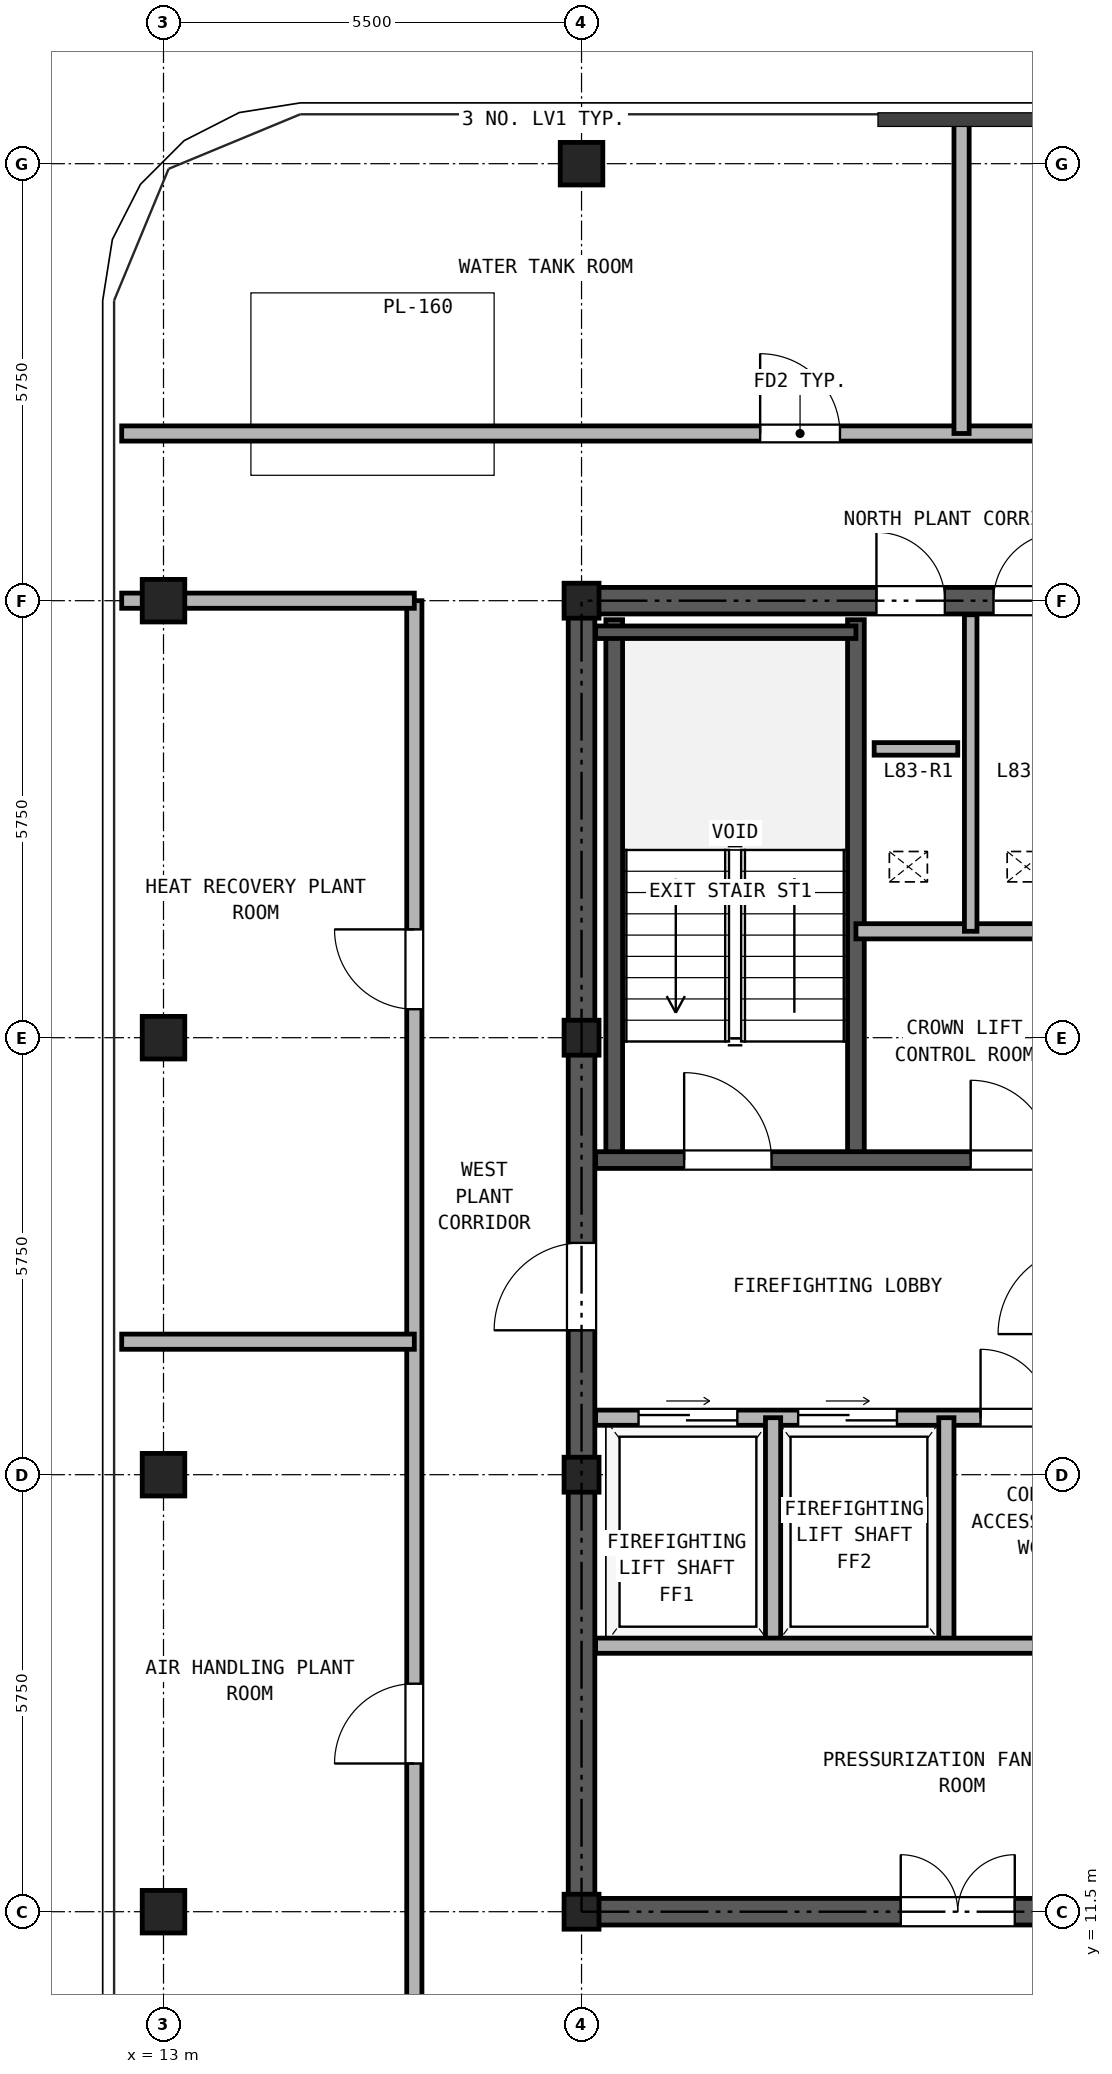
"""IFC4 building model, lengths in metres.
Left out: names, types, materials, properties, quantities, classifications, styles, units other than length and angle.
Written with IfcOpenShell. Run it as: python <this file> out.ifc"""

import sys

from ifc_helpers import new_model, si_unit, direction, frame, frame_2d, origin, origin_2d, place, context, subcontext, project, spatial, rectangle, hollow_rectangle, extrude, source, transform, mapped, element, fill, save


model = new_model("IFC4")
c1 = context("Model", 3, precision=1e-05, world=origin(), true_north=direction((0.0, 1.0)))
c2 = subcontext(c1, "Body", "Model", "MODEL_VIEW")
j1 = project(units=[si_unit("LENGTHUNIT", "METRE"), si_unit("PLANEANGLEUNIT", "RADIAN")], contexts=[c1])
p1 = place(None, origin())
s1 = spatial("IfcSite", under=j1, at=p1, CompositionType="ELEMENT")
p2 = place(p1, origin())
s2 = spatial("IfcBuilding", under=s1, at=p2, CompositionType="ELEMENT")
p3 = place(p2, frame((0.0, 0.0, 289.3)))
s3 = spatial("IfcBuildingStorey", under=s2, at=p3, CompositionType="ELEMENT", Elevation=289.3)
m1 = source(origin(), c2, "Body", "SweptSolid", [
    extrude(hollow_rectangle(XDim=0.56, YDim=0.56, WallThickness=0.03, at=origin_2d()), origin(), (0.0, 0.0, 1.0), 3.38),
])
for number, where, z_axis, x_axis in (
    (1, (18.5, 34.5, 0.0), (0.0, 0.0, 1.0), (1.0, 0.0, 0.0)),
    (2, (13.0, 11.5, 0.0), (0.0, 0.0, 1.0), (1.0, 0.0, 0.0)),
    (3, (13.0, 17.25, 0.0), (0.0, 0.0, 1.0), (1.0, 0.0, 0.0)),
    (4, (13.0, 23.0, 0.0), (0.0, 0.0, 1.0), (1.0, 0.0, 0.0)),
    (5, (13.0, 28.75, 0.0), (0.0, 0.0, 1.0), (1.0, 0.0, 0.0)),
):
    element("IfcColumn", number, at=place(p3, frame(where, z_axis=z_axis, x_axis=x_axis)), inside=s3, PredefinedType="COLUMN", context=c2, shape_type="MappedRepresentation", body=[
        mapped(m1, transform((0.0, 0.0, 0.0), x_axis=(1.0, 0.0, 0.0), y_axis=(0.0, 1.0, 0.0), z_axis=(0.0, 0.0, 1.0), scale=1.0)),
    ])
m2 = source(origin(), c2, "Body", "SweptSolid", [
    extrude(hollow_rectangle(XDim=0.46, YDim=0.46, WallThickness=0.025, at=origin_2d()), origin(), (0.0, 0.0, 1.0), 3.38),
])
for number, where, z_axis, x_axis in (
    (6, (18.5, 11.5, 0.0), (0.0, 0.0, 1.0), (1.0, 0.0, 0.0)),
    (7, (18.5, 17.25, 0.0), (0.0, 0.0, 1.0), (1.0, 0.0, 0.0)),
    (8, (18.5, 23.0, 0.0), (0.0, 0.0, 1.0), (1.0, 0.0, 0.0)),
    (9, (18.5, 28.75, 0.0), (0.0, 0.0, 1.0), (1.0, 0.0, 0.0)),
):
    element("IfcColumn", number, at=place(p3, frame(where, z_axis=z_axis, x_axis=x_axis)), inside=s3, PredefinedType="COLUMN", context=c2, shape_type="MappedRepresentation", body=[
        mapped(m2, transform((0.0, 0.0, 0.0), x_axis=(1.0, 0.0, 0.0), y_axis=(0.0, 1.0, 0.0), z_axis=(0.0, 0.0, 1.0), scale=1.0)),
    ])
p4 = place(p3, frame((18.325, 11.5, 0.0), z_axis=(0.0, 0.0, 1.0), x_axis=(1.0, 0.0, 0.0)))
e10 = element("IfcWall", 10, at=p4, inside=s3, PredefinedType="SHEAR", context=c2, shape_type="SweptSolid", body=[
    extrude(rectangle(XDim=10.35, YDim=0.35, at=frame_2d((5.175, 0.0))), origin(), (0.0, 0.0, 1.0), 3.38),
])
p5 = place(p4, frame((4.375, 0.0, 0.0)))
e11 = element("IfcOpeningElement", 11, at=p5, cuts=e10, PredefinedType="OPENING", context=c2, shape_type="SweptSolid", body=[
    extrude(rectangle(XDim=1.5, YDim=2.25, at=frame_2d((0.75, 1.125))), frame((0.0, 0.185, 0.0), z_axis=(0.0, -1.0, 0.0), x_axis=(1.0, 0.0, 0.0)), (0.0, 0.0, 1.0), 0.37),
])
p6 = place(p3, frame((18.325, 28.75, 0.0), z_axis=(0.0, 0.0, 1.0), x_axis=(1.0, 0.0, 0.0)))
e12 = element("IfcWall", 12, at=p6, inside=s3, PredefinedType="SHEAR", context=c2, shape_type="SweptSolid", body=[
    extrude(rectangle(XDim=10.35, YDim=0.35, at=frame_2d((5.175, 0.0))), origin(), (0.0, 0.0, 1.0), 3.38),
])
p7 = place(p6, frame((4.055, 0.0, 0.0)))
e13 = element("IfcOpeningElement", 13, at=p7, cuts=e12, PredefinedType="OPENING", context=c2, shape_type="SweptSolid", body=[
    extrude(rectangle(XDim=0.9, YDim=2.05, at=frame_2d((0.45, 1.025))), frame((0.0, 0.185, 0.0), z_axis=(0.0, -1.0, 0.0), x_axis=(1.0, 0.0, 0.0)), (0.0, 0.0, 1.0), 0.37),
])
p8 = place(p6, frame((5.595, 0.0, 0.0)))
e14 = element("IfcOpeningElement", 14, at=p8, cuts=e12, PredefinedType="OPENING", context=c2, shape_type="SweptSolid", body=[
    extrude(rectangle(XDim=0.9, YDim=2.05, at=frame_2d((0.45, 1.025))), frame((0.0, 0.185, 0.0), z_axis=(0.0, -1.0, 0.0), x_axis=(1.0, 0.0, 0.0)), (0.0, 0.0, 1.0), 0.37),
])
p9 = place(p3, frame((18.5, 11.675, 0.0), z_axis=(0.0, 0.0, 1.0), x_axis=(0.0, 1.0, 0.0)))
e15 = element("IfcWall", 15, at=p9, inside=s3, PredefinedType="SHEAR", context=c2, shape_type="SweptSolid", body=[
    extrude(rectangle(XDim=16.9, YDim=0.35, at=frame_2d((8.45, 0.0))), origin(), (0.0, 0.0, 1.0), 3.38),
])
p10 = place(p9, frame((7.475, 0.0, 0.0)))
e16 = element("IfcOpeningElement", 16, at=p10, cuts=e15, PredefinedType="OPENING", context=c2, shape_type="SweptSolid", body=[
    extrude(rectangle(XDim=1.15, YDim=2.2, at=frame_2d((0.575, 1.1))), frame((0.0, 0.185, 0.0), z_axis=(0.0, -1.0, 0.0), x_axis=(1.0, 0.0, 0.0)), (0.0, 0.0, 1.0), 0.37),
])
for number, where, z_axis, x_axis in (
    (17, (18.93, 21.39, 0.0), (0.0, 0.0, 1.0), (0.0, 1.0, 0.0)),
    (18, (22.11, 21.39, 0.0), (0.0, 0.0, 1.0), (0.0, 1.0, 0.0)),
):
    element("IfcWall", number, at=place(p3, frame(where, z_axis=z_axis, x_axis=x_axis)), inside=s3, PredefinedType="SOLIDWALL", context=c2, shape_type="SweptSolid", body=[
        extrude(rectangle(XDim=7.11, YDim=0.22, at=frame_2d((3.555, 0.0))), origin(), (0.0, 0.0, 1.0), 3.38),
    ])
p11 = place(p3, frame((18.685, 28.335, 0.0), z_axis=(0.0, 0.0, 1.0), x_axis=(1.0, 0.0, 0.0)))
e19 = element("IfcWall", 19, at=p11, inside=s3, PredefinedType="PARTITIONING", context=c2, shape_type="SweptSolid", body=[
    extrude(rectangle(XDim=3.425, YDim=0.165, at=frame_2d((1.712, 0.0))), origin(), (0.0, 0.0, 1.0), 3.38),
])
p12 = place(p3, frame((18.685, 21.39, 0.0), z_axis=(0.0, 0.0, 1.0), x_axis=(1.0, 0.0, 0.0)))
e20 = element("IfcWall", 20, at=p12, inside=s3, PredefinedType="SOLIDWALL", context=c2, shape_type="SweptSolid", body=[
    extrude(rectangle(XDim=6.445, YDim=0.22, at=frame_2d((3.222, 0.0))), origin(), (0.0, 0.0, 1.0), 3.38),
])
p13 = place(p12, frame((1.165, 0.0, 0.0)))
e21 = element("IfcOpeningElement", 21, at=p13, cuts=e20, PredefinedType="OPENING", context=c2, shape_type="SweptSolid", body=[
    extrude(rectangle(XDim=1.15, YDim=2.2, at=frame_2d((0.575, 1.1))), frame((0.0, 0.12, 0.0), z_axis=(0.0, -1.0, 0.0), x_axis=(1.0, 0.0, 0.0)), (0.0, 0.0, 1.0), 0.24),
])
p14 = place(p12, frame((4.935, 0.0, 0.0)))
e22 = element("IfcOpeningElement", 22, at=p14, cuts=e20, PredefinedType="OPENING", context=c2, shape_type="SweptSolid", body=[
    extrude(rectangle(XDim=1.05, YDim=2.15, at=frame_2d((0.525, 1.075))), frame((0.0, 0.12, 0.0), z_axis=(0.0, -1.0, 0.0), x_axis=(1.0, 0.0, 0.0)), (0.0, 0.0, 1.0), 0.24),
])
p15 = place(p3, frame((22.11, 24.4, 0.0), z_axis=(0.0, 0.0, 1.0), x_axis=(1.0, 0.0, 0.0)))
e23 = element("IfcWall", 23, at=p15, inside=s3, PredefinedType="PARTITIONING", context=c2, shape_type="SweptSolid", body=[
    extrude(rectangle(XDim=3.02, YDim=0.2, at=frame_2d((1.51, 0.0))), origin(), (0.0, 0.0, 1.0), 3.38),
])
p16 = place(p3, frame((23.62, 24.4, 0.0), z_axis=(0.0, 0.0, 1.0), x_axis=(0.0, 1.0, 0.0)))
e24 = element("IfcWall", 24, at=p16, inside=s3, PredefinedType="PARTITIONING", context=c2, shape_type="SweptSolid", body=[
    extrude(rectangle(XDim=4.165, YDim=0.165, at=frame_2d((2.083, 0.0))), origin(), (0.0, 0.0, 1.0), 3.38),
])
p17 = place(p3, frame((18.685, 18.0, 0.0), z_axis=(0.0, 0.0, 1.0), x_axis=(1.0, 0.0, 0.0)))
e25 = element("IfcWall", 25, at=p17, inside=s3, PredefinedType="PARTITIONING", context=c2, shape_type="SweptSolid", body=[
    extrude(rectangle(XDim=9.63, YDim=0.2, at=frame_2d((4.815, 0.0))), origin(), (0.0, 0.0, 1.0), 3.38),
])
p18 = place(p17, frame((0.565, 0.0, 0.0)))
e26 = element("IfcOpeningElement", 26, at=p18, cuts=e25, PredefinedType="OPENING", context=c2, shape_type="SweptSolid", body=[
    extrude(rectangle(XDim=1.3, YDim=2.3, at=frame_2d((0.65, 1.15))), frame((0.0, 0.11, 0.0), z_axis=(0.0, -1.0, 0.0), x_axis=(1.0, 0.0, 0.0)), (0.0, 0.0, 1.0), 0.22),
])
p19 = place(p17, frame((2.665, 0.0, 0.0)))
e27 = element("IfcOpeningElement", 27, at=p19, cuts=e25, PredefinedType="OPENING", context=c2, shape_type="SweptSolid", body=[
    extrude(rectangle(XDim=1.3, YDim=2.3, at=frame_2d((0.65, 1.15))), frame((0.0, 0.11, 0.0), z_axis=(0.0, -1.0, 0.0), x_axis=(1.0, 0.0, 0.0)), (0.0, 0.0, 1.0), 0.22),
])
p20 = place(p17, frame((5.065, 0.0, 0.0)))
e28 = element("IfcOpeningElement", 28, at=p20, cuts=e25, PredefinedType="OPENING", context=c2, shape_type="SweptSolid", body=[
    extrude(rectangle(XDim=0.9, YDim=2.05, at=frame_2d((0.45, 1.025))), frame((0.0, 0.11, 0.0), z_axis=(0.0, -1.0, 0.0), x_axis=(1.0, 0.0, 0.0)), (0.0, 0.0, 1.0), 0.22),
])
p21 = place(p17, frame((7.765, 0.0, 0.0)))
e29 = element("IfcOpeningElement", 29, at=p21, cuts=e25, PredefinedType="OPENING", context=c2, shape_type="SweptSolid", body=[
    extrude(rectangle(XDim=0.9, YDim=2.05, at=frame_2d((0.45, 1.025))), frame((0.0, 0.11, 0.0), z_axis=(0.0, -1.0, 0.0), x_axis=(1.0, 0.0, 0.0)), (0.0, 0.0, 1.0), 0.22),
])
for number, where, z_axis, x_axis in (
    (30, (21.02, 15.0, 0.0), (0.0, 0.0, 1.0), (0.0, 1.0, 0.0)),
    (31, (23.3, 15.0, 0.0), (0.0, 0.0, 1.0), (0.0, 1.0, 0.0)),
):
    element("IfcWall", number, at=place(p3, frame(where, z_axis=z_axis, x_axis=x_axis)), inside=s3, PredefinedType="PARTITIONING", context=c2, shape_type="SweptSolid", body=[
        extrude(rectangle(XDim=3.0, YDim=0.2, at=frame_2d((1.5, 0.0))), origin(), (0.0, 0.0, 1.0), 3.38),
    ])
p22 = place(p3, frame((18.685, 15.0, 0.0), z_axis=(0.0, 0.0, 1.0), x_axis=(1.0, 0.0, 0.0)))
e32 = element("IfcWall", 32, at=p22, inside=s3, PredefinedType="PARTITIONING", context=c2, shape_type="SweptSolid", body=[
    extrude(rectangle(XDim=9.63, YDim=0.2, at=frame_2d((4.815, 0.0))), origin(), (0.0, 0.0, 1.0), 3.38),
])
p23 = place(p3, frame((12.45, 30.95, 0.0), z_axis=(0.0, 0.0, 1.0), x_axis=(1.0, 0.0, 0.0)))
e33 = element("IfcWall", 33, at=p23, inside=s3, PredefinedType="PARTITIONING", context=c2, shape_type="SweptSolid", body=[
    extrude(rectangle(XDim=22.1, YDim=0.2, at=frame_2d((11.05, 0.0))), origin(), (0.0, 0.0, 1.0), 3.38),
])
p24 = place(p23, frame((8.4, 0.0, 0.0)))
e34 = element("IfcOpeningElement", 34, at=p24, cuts=e33, PredefinedType="OPENING", context=c2, shape_type="SweptSolid", body=[
    extrude(rectangle(XDim=1.05, YDim=2.15, at=frame_2d((0.525, 1.075))), frame((0.0, 0.11, 0.0), z_axis=(0.0, -1.0, 0.0), x_axis=(1.0, 0.0, 0.0)), (0.0, 0.0, 1.0), 0.22),
])
p25 = place(p23, frame((12.7, 0.0, 0.0)))
e35 = element("IfcOpeningElement", 35, at=p25, cuts=e33, PredefinedType="OPENING", context=c2, shape_type="SweptSolid", body=[
    extrude(rectangle(XDim=1.05, YDim=2.15, at=frame_2d((0.525, 1.075))), frame((0.0, 0.11, 0.0), z_axis=(0.0, -1.0, 0.0), x_axis=(1.0, 0.0, 0.0)), (0.0, 0.0, 1.0), 0.22),
])
p26 = place(p3, frame((16.3, 8.9, 0.0), z_axis=(0.0, 0.0, 1.0), x_axis=(0.0, 1.0, 0.0)))
e36 = element("IfcWall", 36, at=p26, inside=s3, PredefinedType="PARTITIONING", context=c2, shape_type="SweptSolid", body=[
    extrude(rectangle(XDim=19.85, YDim=0.2, at=frame_2d((9.925, 0.0))), origin(), (0.0, 0.0, 1.0), 3.38),
])
p27 = place(p26, frame((4.55, 0.0, 0.0)))
e37 = element("IfcOpeningElement", 37, at=p27, cuts=e36, PredefinedType="OPENING", context=c2, shape_type="SweptSolid", body=[
    extrude(rectangle(XDim=1.05, YDim=2.15, at=frame_2d((0.525, 1.075))), frame((0.0, 0.11, 0.0), z_axis=(0.0, -1.0, 0.0), x_axis=(1.0, 0.0, 0.0)), (0.0, 0.0, 1.0), 0.22),
])
p28 = place(p26, frame((14.475, 0.0, 0.0)))
e38 = element("IfcOpeningElement", 38, at=p28, cuts=e36, PredefinedType="OPENING", context=c2, shape_type="SweptSolid", body=[
    extrude(rectangle(XDim=1.05, YDim=2.15, at=frame_2d((0.525, 1.075))), frame((0.0, 0.11, 0.0), z_axis=(0.0, -1.0, 0.0), x_axis=(1.0, 0.0, 0.0)), (0.0, 0.0, 1.0), 0.22),
])
p29 = place(p3, frame((12.45, 28.75, 0.0), z_axis=(0.0, 0.0, 1.0), x_axis=(1.0, 0.0, 0.0)))
e39 = element("IfcWall", 39, at=p29, inside=s3, PredefinedType="PARTITIONING", context=c2, shape_type="SweptSolid", body=[
    extrude(rectangle(XDim=3.85, YDim=0.2, at=frame_2d((1.925, 0.0))), origin(), (0.0, 0.0, 1.0), 2.905),
])
p30 = place(p3, frame((23.5, 30.95, 0.0), z_axis=(0.0, 0.0, 1.0), x_axis=(0.0, 1.0, 0.0)))
e40 = element("IfcWall", 40, at=p30, inside=s3, PredefinedType="PARTITIONING", context=c2, shape_type="SweptSolid", body=[
    extrude(rectangle(XDim=4.1, YDim=0.2, at=frame_2d((2.05, 0.0))), origin(), (0.0, 0.0, 1.0), 3.38),
])
p31 = place(p3, frame((12.45, 19.0, 0.0), z_axis=(0.0, 0.0, 1.0), x_axis=(1.0, 0.0, 0.0)))
e41 = element("IfcWall", 41, at=p31, inside=s3, PredefinedType="PARTITIONING", context=c2, shape_type="SweptSolid", body=[
    extrude(rectangle(XDim=3.85, YDim=0.2, at=frame_2d((1.925, 0.0))), origin(), (0.0, 0.0, 1.0), 3.38),
])
p32 = place(p3, frame((22.35, 26.8, 0.0), z_axis=(0.0, 0.0, 1.0), x_axis=(1.0, 0.0, 0.0)))
e42 = element("IfcWall", 42, at=p32, inside=s3, PredefinedType="PARTITIONING", context=c2, shape_type="SweptSolid", body=[
    extrude(rectangle(XDim=1.1, YDim=0.165, at=frame_2d((0.55, 0.0))), origin(), (0.0, 0.0, 1.0), 3.38),
])
p33 = place(p13, frame((1.15, 0.0, 0.0), z_axis=(0.0, 0.0, 1.0), x_axis=(-1.0, 0.0, 0.0)))
e43 = element("IfcDoor", 43, at=p33, inside=s3, OperationType="SINGLE_SWING_LEFT", PredefinedType="DOOR", context=c2, shape_type="SweptSolid", body=[
    extrude(rectangle(XDim=1.15, YDim=2.2, at=frame_2d((0.575, 1.1))), frame((0.0, 0.025, 0.0), z_axis=(0.0, -1.0, 0.0), x_axis=(1.0, 0.0, 0.0)), (0.0, 0.0, 1.0), 0.05),
])
fill(e21, e43)
p34 = place(p14, origin())
e44 = element("IfcDoor", 44, at=p34, inside=s3, OperationType="SINGLE_SWING_LEFT", PredefinedType="DOOR", context=c2, shape_type="SweptSolid", body=[
    extrude(rectangle(XDim=1.05, YDim=2.15, at=frame_2d((0.525, 1.075))), frame((0.0, 0.025, 0.0), z_axis=(0.0, -1.0, 0.0), x_axis=(1.0, 0.0, 0.0)), (0.0, 0.0, 1.0), 0.05),
])
fill(e22, e44)
p35 = place(p18, origin())
e45 = element("IfcDoor", 45, at=p35, inside=s3, OperationType="DOUBLE_DOOR_SLIDING", PredefinedType="DOOR", context=c2, shape_type="SweptSolid", body=[
    extrude(rectangle(XDim=1.3, YDim=2.3, at=frame_2d((0.65, 1.15))), frame((0.0, 0.025, 0.0), z_axis=(0.0, -1.0, 0.0), x_axis=(1.0, 0.0, 0.0)), (0.0, 0.0, 1.0), 0.05),
])
fill(e26, e45)
p36 = place(p19, origin())
e46 = element("IfcDoor", 46, at=p36, inside=s3, OperationType="DOUBLE_DOOR_SLIDING", PredefinedType="DOOR", context=c2, shape_type="SweptSolid", body=[
    extrude(rectangle(XDim=1.3, YDim=2.3, at=frame_2d((0.65, 1.15))), frame((0.0, 0.025, 0.0), z_axis=(0.0, -1.0, 0.0), x_axis=(1.0, 0.0, 0.0)), (0.0, 0.0, 1.0), 0.05),
])
fill(e27, e46)
p37 = place(p20, frame((0.9, 0.0, 0.0), z_axis=(0.0, 0.0, 1.0), x_axis=(-1.0, 0.0, 0.0)))
e47 = element("IfcDoor", 47, at=p37, inside=s3, OperationType="SINGLE_SWING_LEFT", PredefinedType="DOOR", context=c2, shape_type="SweptSolid", body=[
    extrude(rectangle(XDim=0.9, YDim=2.05, at=frame_2d((0.45, 1.025))), frame((0.0, 0.025, 0.0), z_axis=(0.0, -1.0, 0.0), x_axis=(1.0, 0.0, 0.0)), (0.0, 0.0, 1.0), 0.05),
])
fill(e28, e47)
p38 = place(p10, frame((1.15, 0.0, 0.0), z_axis=(0.0, 0.0, 1.0), x_axis=(-1.0, 0.0, 0.0)))
e48 = element("IfcDoor", 48, at=p38, inside=s3, OperationType="SINGLE_SWING_LEFT", PredefinedType="DOOR", context=c2, shape_type="SweptSolid", body=[
    extrude(rectangle(XDim=1.15, YDim=2.2, at=frame_2d((0.575, 1.1))), frame((0.0, 0.025, 0.0), z_axis=(0.0, -1.0, 0.0), x_axis=(1.0, 0.0, 0.0)), (0.0, 0.0, 1.0), 0.05),
])
fill(e16, e48)
p39 = place(p7, origin())
e49 = element("IfcDoor", 49, at=p39, inside=s3, OperationType="SINGLE_SWING_LEFT", PredefinedType="DOOR", context=c2, shape_type="SweptSolid", body=[
    extrude(rectangle(XDim=0.9, YDim=2.05, at=frame_2d((0.45, 1.025))), frame((0.0, 0.025, 0.0), z_axis=(0.0, -1.0, 0.0), x_axis=(1.0, 0.0, 0.0)), (0.0, 0.0, 1.0), 0.05),
])
fill(e13, e49)
p40 = place(p8, origin())
e50 = element("IfcDoor", 50, at=p40, inside=s3, OperationType="SINGLE_SWING_RIGHT", PredefinedType="DOOR", context=c2, shape_type="SweptSolid", body=[
    extrude(rectangle(XDim=0.9, YDim=2.05, at=frame_2d((0.45, 1.025))), frame((0.0, 0.025, 0.0), z_axis=(0.0, -1.0, 0.0), x_axis=(1.0, 0.0, 0.0)), (0.0, 0.0, 1.0), 0.05),
])
fill(e14, e50)
p41 = place(p5, frame((1.5, 0.0, 0.0), z_axis=(0.0, 0.0, 1.0), x_axis=(-1.0, 0.0, 0.0)))
e51 = element("IfcDoor", 51, at=p41, inside=s3, OperationType="DOUBLE_DOOR_SINGLE_SWING", PredefinedType="DOOR", context=c2, shape_type="SweptSolid", body=[
    extrude(rectangle(XDim=1.5, YDim=2.25, at=frame_2d((0.75, 1.125))), frame((0.0, 0.025, 0.0), z_axis=(0.0, -1.0, 0.0), x_axis=(1.0, 0.0, 0.0)), (0.0, 0.0, 1.0), 0.05),
])
fill(e11, e51)
p42 = place(p24, origin())
e52 = element("IfcDoor", 52, at=p42, inside=s3, OperationType="SINGLE_SWING_LEFT", PredefinedType="DOOR", context=c2, shape_type="SweptSolid", body=[
    extrude(rectangle(XDim=1.05, YDim=2.15, at=frame_2d((0.525, 1.075))), frame((0.0, 0.025, 0.0), z_axis=(0.0, -1.0, 0.0), x_axis=(1.0, 0.0, 0.0)), (0.0, 0.0, 1.0), 0.05),
])
fill(e34, e52)
p43 = place(p27, frame((1.05, 0.0, 0.0), z_axis=(0.0, 0.0, 1.0), x_axis=(-1.0, 0.0, 0.0)))
e53 = element("IfcDoor", 53, at=p43, inside=s3, OperationType="SINGLE_SWING_LEFT", PredefinedType="DOOR", context=c2, shape_type="SweptSolid", body=[
    extrude(rectangle(XDim=1.05, YDim=2.15, at=frame_2d((0.525, 1.075))), frame((0.0, 0.025, 0.0), z_axis=(0.0, -1.0, 0.0), x_axis=(1.0, 0.0, 0.0)), (0.0, 0.0, 1.0), 0.05),
])
fill(e37, e53)
p44 = place(p28, frame((1.05, 0.0, 0.0), z_axis=(0.0, 0.0, 1.0), x_axis=(-1.0, 0.0, 0.0)))
e54 = element("IfcDoor", 54, at=p44, inside=s3, OperationType="SINGLE_SWING_RIGHT", PredefinedType="DOOR", context=c2, shape_type="SweptSolid", body=[
    extrude(rectangle(XDim=1.05, YDim=2.15, at=frame_2d((0.525, 1.075))), frame((0.0, 0.025, 0.0), z_axis=(0.0, -1.0, 0.0), x_axis=(1.0, 0.0, 0.0)), (0.0, 0.0, 1.0), 0.05),
])
fill(e38, e54)
save(model, sys.argv[1])
